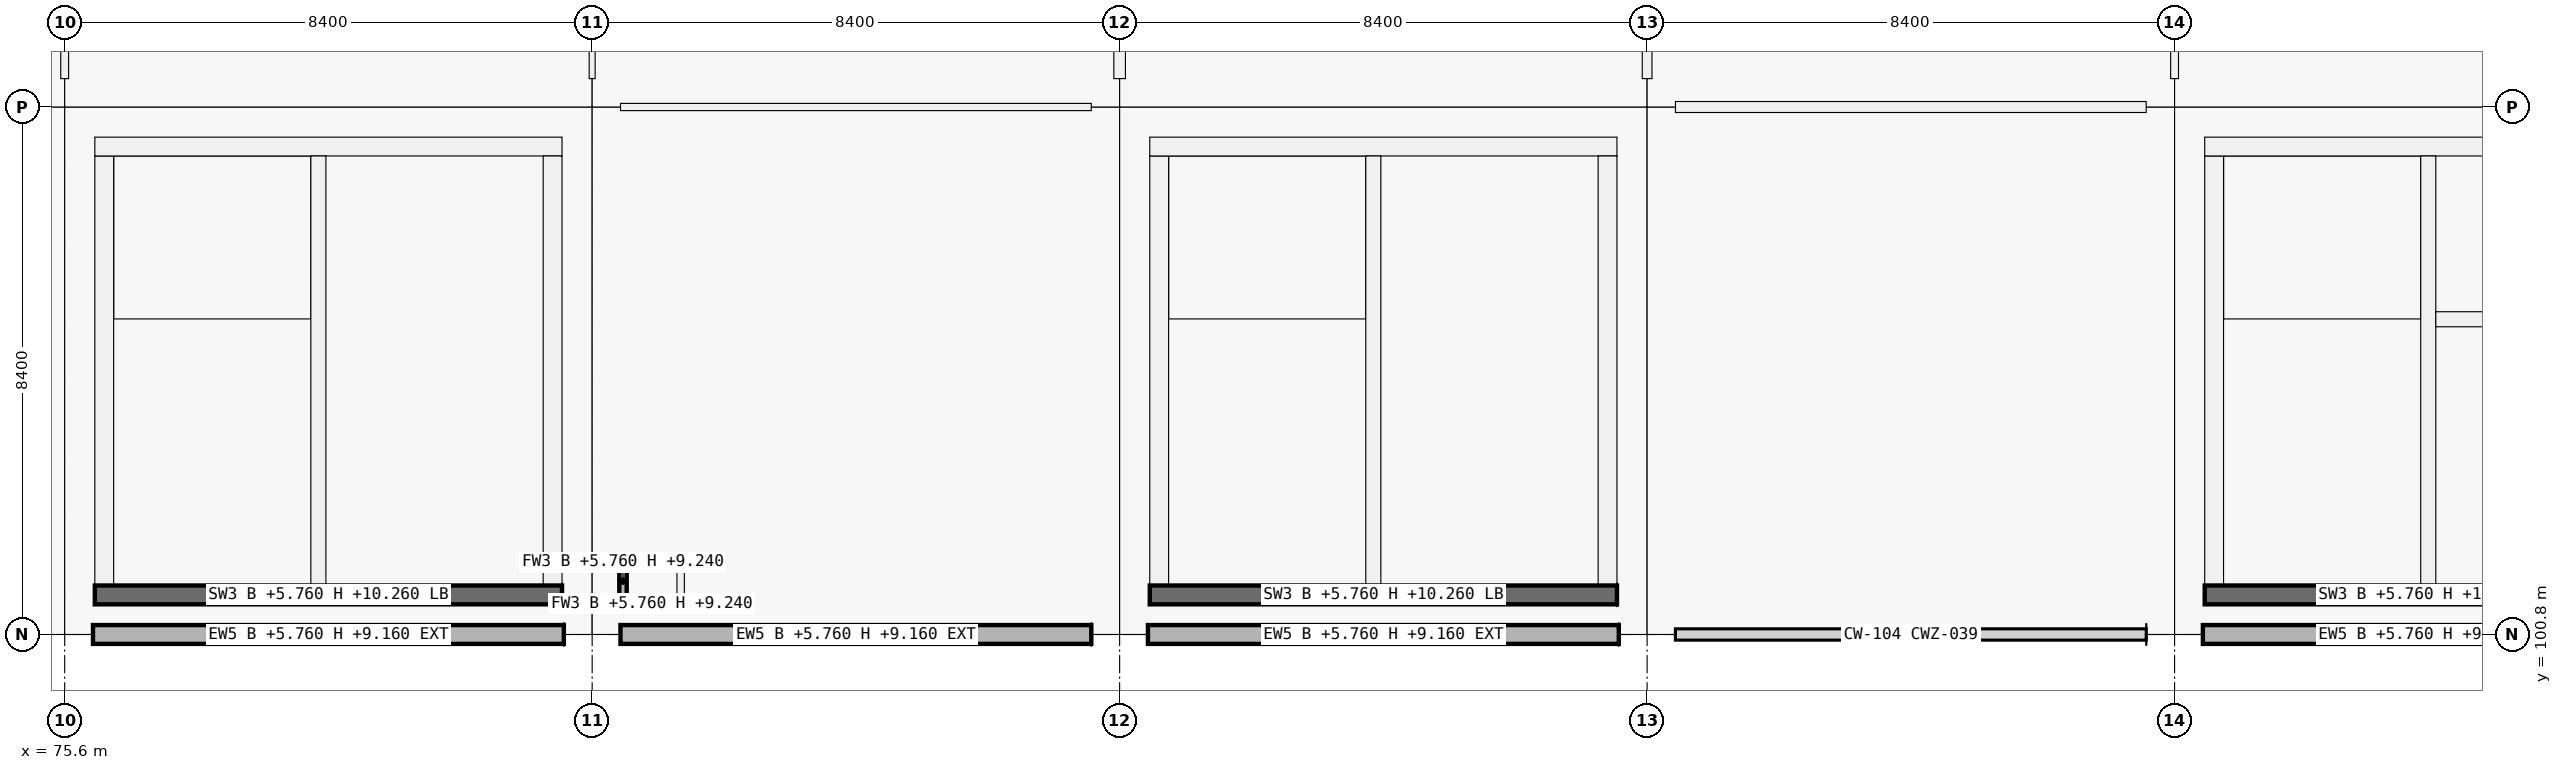
"""IFC4 building model, lengths in metres.
Left out: names, types, materials, properties, quantities, classifications, styles, units other than length and angle.
Written with IfcOpenShell. Run it as: python <this file> out.ifc"""

import sys

from ifc_helpers import new_model, si_unit, direction, frame, frame_2d, origin, origin_2d, place, context, subcontext, project, spatial, rectangle, extrude, element, fill, save


model = new_model("IFC4")
c1 = context("Model", 3, precision=1e-05, world=origin(), true_north=direction((0.0, 1.0)))
c2 = subcontext(c1, "Body", "Model", "MODEL_VIEW")
j1 = project(units=[si_unit("LENGTHUNIT", "METRE"), si_unit("PLANEANGLEUNIT", "RADIAN")], contexts=[c1])
p1 = place(None, origin())
s1 = spatial("IfcSite", under=j1, at=p1, CompositionType="ELEMENT")
p2 = place(p1, origin())
s2 = spatial("IfcBuilding", under=s1, at=p2, CompositionType="ELEMENT")
p3 = place(p2, frame((0.0, 0.0, 5.76)))
s3 = spatial("IfcBuildingStorey", under=s2, at=p3, CompositionType="ELEMENT", Elevation=5.76)
for number, where, z_axis, x_axis in (
    (1, (75.6, 100.8, 0.0), (0.0, 0.0, 1.0), (1.0, 0.0, 0.0)),
    (2, (75.6, 109.2, 0.0), (0.0, 0.0, 1.0), (1.0, 0.0, 0.0)),
    (3, (84.0, 100.8, 0.0), (0.0, 0.0, 1.0), (1.0, 0.0, 0.0)),
    (4, (84.0, 109.2, 0.0), (0.0, 0.0, 1.0), (1.0, 0.0, 0.0)),
    (5, (92.4, 100.8, 0.0), (0.0, 0.0, 1.0), (1.0, 0.0, 0.0)),
    (6, (92.4, 109.2, 0.0), (0.0, 0.0, 1.0), (1.0, 0.0, 0.0)),
    (7, (100.8, 100.8, 0.0), (0.0, 0.0, 1.0), (1.0, 0.0, 0.0)),
    (8, (100.8, 109.2, 0.0), (0.0, 0.0, 1.0), (1.0, 0.0, 0.0)),
    (9, (109.2, 100.8, 0.0), (0.0, 0.0, 1.0), (1.0, 0.0, 0.0)),
    (10, (109.2, 109.2, 0.0), (0.0, 0.0, 1.0), (1.0, 0.0, 0.0)),
):
    element("IfcColumn", number, at=place(p3, frame(where, z_axis=z_axis, x_axis=x_axis)), inside=s3, PredefinedType="COLUMN", context=c2, shape_type="SweptSolid", body=[
        extrude(rectangle(XDim=0.9, YDim=0.9, at=origin_2d()), origin(), (0.0, 0.0, 1.0), 4.5),
    ])
p4 = place(p3, frame((83.549, 100.8, 0.0), z_axis=(0.0, 0.0, 1.0), x_axis=(-1.0, 0.0, 0.0)))
e11 = element("IfcWall", 11, at=p4, inside=s3, PredefinedType="SOLIDWALL", context=c2, shape_type="SweptSolid", body=[
    extrude(rectangle(XDim=7.498, YDim=0.3, at=frame_2d((3.749, 0.0))), origin(), (0.0, 0.0, 1.0), 3.4),
])
p5 = place(p3, frame((91.949, 100.8, 0.0), z_axis=(0.0, 0.0, 1.0), x_axis=(-1.0, 0.0, 0.0)))
e12 = element("IfcWall", 12, at=p5, inside=s3, PredefinedType="SOLIDWALL", context=c2, shape_type="SweptSolid", body=[
    extrude(rectangle(XDim=7.498, YDim=0.3, at=frame_2d((3.749, 0.0))), origin(), (0.0, 0.0, 1.0), 3.4),
])
p6 = place(p5, frame((2.249, 0.0, 0.9)))
e13 = element("IfcOpeningElement", 13, at=p6, cuts=e12, PredefinedType="OPENING", context=c2, shape_type="SweptSolid", body=[
    extrude(rectangle(XDim=3.0, YDim=1.2, at=frame_2d((1.5, 0.6))), frame((0.0, 0.15, 0.0), z_axis=(0.0, -1.0, 0.0), x_axis=(1.0, 0.0, 0.0)), (0.0, 0.0, 1.0), 0.3),
])
for number, where, z_axis, x_axis in (
    (14, (100.349, 100.8, 0.0), (0.0, 0.0, 1.0), (-1.0, 0.0, 0.0)),
    (15, (117.149, 100.8, 0.0), (0.0, 0.0, 1.0), (-1.0, 0.0, 0.0)),
):
    element("IfcWall", number, at=place(p3, frame(where, z_axis=z_axis, x_axis=x_axis)), inside=s3, PredefinedType="SOLIDWALL", context=c2, shape_type="SweptSolid", body=[
        extrude(rectangle(XDim=7.498, YDim=0.3, at=frame_2d((3.749, 0.0))), origin(), (0.0, 0.0, 1.0), 3.4),
    ])
p7 = place(p3, frame((117.12, 101.43, 0.0), z_axis=(0.0, 0.0, 1.0), x_axis=(-1.0, 0.0, 0.0)))
e16 = element("IfcWall", 16, at=p7, inside=s3, PredefinedType="SHEAR", context=c2, shape_type="SweptSolid", body=[
    extrude(rectangle(XDim=7.44, YDim=0.3, at=frame_2d((3.72, 0.0))), origin(), (0.0, 0.0, 1.0), 4.5),
])
p8 = place(p3, frame((109.83, 101.58, 0.0), z_axis=(0.0, 0.0, 1.0), x_axis=(0.0, 1.0, 0.0)))
e17 = element("IfcWall", 17, at=p8, inside=s3, PredefinedType="SHEAR", context=c2, shape_type="SweptSolid", body=[
    extrude(rectangle(XDim=6.84, YDim=0.3, at=frame_2d((3.42, 0.0))), origin(), (0.0, 0.0, 1.0), 4.5),
])
p9 = place(p3, frame((109.68, 108.57, 0.0), z_axis=(0.0, 0.0, 1.0), x_axis=(1.0, 0.0, 0.0)))
e18 = element("IfcWall", 18, at=p9, inside=s3, PredefinedType="SHEAR", context=c2, shape_type="SweptSolid", body=[
    extrude(rectangle(XDim=7.44, YDim=0.3, at=frame_2d((3.72, 0.0))), origin(), (0.0, 0.0, 1.0), 4.5),
])
p10 = place(p3, frame((113.24, 101.58, 0.0), z_axis=(0.0, 0.0, 1.0), x_axis=(0.0, 1.0, 0.0)))
e19 = element("IfcWall", 19, at=p10, inside=s3, PredefinedType="SHEAR", context=c2, shape_type="SweptSolid", body=[
    extrude(rectangle(XDim=6.84, YDim=0.24, at=frame_2d((3.42, 0.0))), origin(), (0.0, 0.0, 1.0), 4.5),
])
p11 = place(p10, frame((0.12, 0.0, 0.0)))
e20 = element("IfcOpeningElement", 20, at=p11, cuts=e19, PredefinedType="OPENING", context=c2, shape_type="SweptSolid", body=[
    extrude(rectangle(XDim=1.0, YDim=2.15, at=frame_2d((0.5, 1.075))), frame((0.0, 0.12, 0.0), z_axis=(0.0, -1.0, 0.0), x_axis=(1.0, 0.0, 0.0)), (0.0, 0.0, 1.0), 0.24),
])
p12 = place(p3, frame((113.36, 105.82, 0.0), z_axis=(0.0, 0.0, 1.0), x_axis=(1.0, 0.0, 0.0)))
e21 = element("IfcWall", 21, at=p12, inside=s3, PredefinedType="SHEAR", context=c2, shape_type="SweptSolid", body=[
    extrude(rectangle(XDim=3.46, YDim=0.24, at=frame_2d((1.73, 0.0))), origin(), (0.0, 0.0, 1.0), 4.5),
])
p13 = place(p12, frame((1.13, 0.0, 0.0)))
e22 = element("IfcOpeningElement", 22, at=p13, cuts=e21, PredefinedType="OPENING", context=c2, shape_type="SweptSolid", body=[
    extrude(rectangle(XDim=1.2, YDim=2.2, at=frame_2d((0.6, 1.1))), frame((0.0, 0.12, 0.0), z_axis=(0.0, -1.0, 0.0), x_axis=(1.0, 0.0, 0.0)), (0.0, 0.0, 1.0), 0.24),
])
p14 = place(p3, frame((83.52, 101.43, 0.0), z_axis=(0.0, 0.0, 1.0), x_axis=(-1.0, 0.0, 0.0)))
e23 = element("IfcWall", 23, at=p14, inside=s3, PredefinedType="SHEAR", context=c2, shape_type="SweptSolid", body=[
    extrude(rectangle(XDim=7.44, YDim=0.3, at=frame_2d((3.72, 0.0))), origin(), (0.0, 0.0, 1.0), 4.5),
])
p15 = place(p3, frame((76.23, 101.58, 0.0), z_axis=(0.0, 0.0, 1.0), x_axis=(0.0, 1.0, 0.0)))
e24 = element("IfcWall", 24, at=p15, inside=s3, PredefinedType="SHEAR", context=c2, shape_type="SweptSolid", body=[
    extrude(rectangle(XDim=6.84, YDim=0.3, at=frame_2d((3.42, 0.0))), origin(), (0.0, 0.0, 1.0), 4.5),
])
p16 = place(p3, frame((76.08, 108.57, 0.0), z_axis=(0.0, 0.0, 1.0), x_axis=(1.0, 0.0, 0.0)))
e25 = element("IfcWall", 25, at=p16, inside=s3, PredefinedType="SHEAR", context=c2, shape_type="SweptSolid", body=[
    extrude(rectangle(XDim=7.44, YDim=0.3, at=frame_2d((3.72, 0.0))), origin(), (0.0, 0.0, 1.0), 4.5),
])
p17 = place(p3, frame((83.37, 108.42, 0.0), z_axis=(0.0, 0.0, 1.0), x_axis=(0.0, -1.0, 0.0)))
e26 = element("IfcWall", 26, at=p17, inside=s3, PredefinedType="SHEAR", context=c2, shape_type="SweptSolid", body=[
    extrude(rectangle(XDim=6.84, YDim=0.3, at=frame_2d((3.42, 0.0))), origin(), (0.0, 0.0, 1.0), 4.5),
])
p18 = place(p17, frame((3.97, 0.0, 0.0)))
e27 = element("IfcOpeningElement", 27, at=p18, cuts=e26, PredefinedType="OPENING", context=c2, shape_type="SweptSolid", body=[
    extrude(rectangle(XDim=1.5, YDim=2.15, at=frame_2d((0.75, 1.075))), frame((0.0, 0.15, 0.0), z_axis=(0.0, -1.0, 0.0), x_axis=(1.0, 0.0, 0.0)), (0.0, 0.0, 1.0), 0.3),
])
p19 = place(p3, frame((79.64, 101.58, 0.0), z_axis=(0.0, 0.0, 1.0), x_axis=(0.0, 1.0, 0.0)))
e28 = element("IfcWall", 28, at=p19, inside=s3, PredefinedType="SHEAR", context=c2, shape_type="SweptSolid", body=[
    extrude(rectangle(XDim=6.84, YDim=0.24, at=frame_2d((3.42, 0.0))), origin(), (0.0, 0.0, 1.0), 4.5),
])
p20 = place(p19, frame((0.12, 0.0, 0.0)))
e29 = element("IfcOpeningElement", 29, at=p20, cuts=e28, PredefinedType="OPENING", context=c2, shape_type="SweptSolid", body=[
    extrude(rectangle(XDim=1.0, YDim=2.15, at=frame_2d((0.5, 1.075))), frame((0.0, 0.12, 0.0), z_axis=(0.0, -1.0, 0.0), x_axis=(1.0, 0.0, 0.0)), (0.0, 0.0, 1.0), 0.24),
])
p21 = place(p3, frame((100.32, 101.43, 0.0), z_axis=(0.0, 0.0, 1.0), x_axis=(-1.0, 0.0, 0.0)))
e30 = element("IfcWall", 30, at=p21, inside=s3, PredefinedType="SHEAR", context=c2, shape_type="SweptSolid", body=[
    extrude(rectangle(XDim=7.44, YDim=0.3, at=frame_2d((3.72, 0.0))), origin(), (0.0, 0.0, 1.0), 4.5),
])
p22 = place(p3, frame((93.03, 101.58, 0.0), z_axis=(0.0, 0.0, 1.0), x_axis=(0.0, 1.0, 0.0)))
e31 = element("IfcWall", 31, at=p22, inside=s3, PredefinedType="SHEAR", context=c2, shape_type="SweptSolid", body=[
    extrude(rectangle(XDim=6.84, YDim=0.3, at=frame_2d((3.42, 0.0))), origin(), (0.0, 0.0, 1.0), 4.5),
])
p23 = place(p3, frame((92.88, 108.57, 0.0), z_axis=(0.0, 0.0, 1.0), x_axis=(1.0, 0.0, 0.0)))
e32 = element("IfcWall", 32, at=p23, inside=s3, PredefinedType="SHEAR", context=c2, shape_type="SweptSolid", body=[
    extrude(rectangle(XDim=7.44, YDim=0.3, at=frame_2d((3.72, 0.0))), origin(), (0.0, 0.0, 1.0), 4.5),
])
p24 = place(p3, frame((100.17, 108.42, 0.0), z_axis=(0.0, 0.0, 1.0), x_axis=(0.0, -1.0, 0.0)))
e33 = element("IfcWall", 33, at=p24, inside=s3, PredefinedType="SHEAR", context=c2, shape_type="SweptSolid", body=[
    extrude(rectangle(XDim=6.84, YDim=0.3, at=frame_2d((3.42, 0.0))), origin(), (0.0, 0.0, 1.0), 4.5),
])
p25 = place(p24, frame((3.97, 0.0, 0.0)))
e34 = element("IfcOpeningElement", 34, at=p25, cuts=e33, PredefinedType="OPENING", context=c2, shape_type="SweptSolid", body=[
    extrude(rectangle(XDim=1.5, YDim=2.15, at=frame_2d((0.75, 1.075))), frame((0.0, 0.15, 0.0), z_axis=(0.0, -1.0, 0.0), x_axis=(1.0, 0.0, 0.0)), (0.0, 0.0, 1.0), 0.3),
])
p26 = place(p3, frame((96.44, 101.58, 0.0), z_axis=(0.0, 0.0, 1.0), x_axis=(0.0, 1.0, 0.0)))
e35 = element("IfcWall", 35, at=p26, inside=s3, PredefinedType="SHEAR", context=c2, shape_type="SweptSolid", body=[
    extrude(rectangle(XDim=6.84, YDim=0.24, at=frame_2d((3.42, 0.0))), origin(), (0.0, 0.0, 1.0), 4.5),
])
p27 = place(p26, frame((0.12, 0.0, 0.0)))
e36 = element("IfcOpeningElement", 36, at=p27, cuts=e35, PredefinedType="OPENING", context=c2, shape_type="SweptSolid", body=[
    extrude(rectangle(XDim=1.0, YDim=2.15, at=frame_2d((0.5, 1.075))), frame((0.0, 0.12, 0.0), z_axis=(0.0, -1.0, 0.0), x_axis=(1.0, 0.0, 0.0)), (0.0, 0.0, 1.0), 0.24),
])
for number, where, z_axis, x_axis in (
    (37, (84.432, 101.291, 0.0), (0.0, 0.0, 1.0), (1.0, 0.0, 0.0)),
    (38, (84.432, 102.009, 0.0), (0.0, 0.0, 1.0), (1.0, 0.0, 0.0)),
):
    element("IfcWall", number, at=place(p3, frame(where, z_axis=z_axis, x_axis=x_axis)), inside=s3, PredefinedType="PARTITIONING", context=c2, shape_type="SweptSolid", body=[
        extrude(rectangle(XDim=1.036, YDim=0.118, at=frame_2d((0.518, 0.0))), origin(), (0.0, 0.0, 1.0), 3.48),
    ])
for number, where, z_axis, x_axis in (
    (39, (84.491, 101.35, 0.0), (0.0, 0.0, 1.0), (0.0, 1.0, 0.0)),
    (40, (85.409, 101.35, 0.0), (0.0, 0.0, 1.0), (0.0, 1.0, 0.0)),
):
    element("IfcWall", number, at=place(p3, frame(where, z_axis=z_axis, x_axis=x_axis)), inside=s3, PredefinedType="PARTITIONING", context=c2, shape_type="SweptSolid", body=[
        extrude(rectangle(XDim=0.6, YDim=0.118, at=frame_2d((0.3, 0.0))), origin(), (0.0, 0.0, 1.0), 3.48),
    ])
p28 = place(p3, frame((84.452, 109.2, 0.0), z_axis=(0.0, 0.0, 1.0), x_axis=(1.0, 0.0, 0.0)))
e41 = element("IfcWall", 41, at=p28, inside=s3, PredefinedType="PARTITIONING", context=c2, shape_type="SweptSolid", body=[
    extrude(rectangle(XDim=7.496, YDim=0.115, at=frame_2d((3.748, 0.0))), origin(), (0.0, 0.0, 1.0), 2.4),
])
p29 = place(p28, frame((3.218, 0.0, 0.0)))
e42 = element("IfcOpeningElement", 42, at=p29, cuts=e41, PredefinedType="OPENING", context=c2, shape_type="SweptSolid", body=[
    extrude(rectangle(XDim=1.06, YDim=2.22, at=frame_2d((0.53, 1.11))), frame((0.0, 0.058, 0.0), z_axis=(0.0, -1.0, 0.0), x_axis=(1.0, 0.0, 0.0)), (0.0, 0.0, 1.0), 0.115),
])
p30 = place(p3, frame((101.252, 109.2, 0.0), z_axis=(0.0, 0.0, 1.0), x_axis=(1.0, 0.0, 0.0)))
e43 = element("IfcWall", 43, at=p30, inside=s3, PredefinedType="PARTITIONING", context=c2, shape_type="SweptSolid", body=[
    extrude(rectangle(XDim=7.496, YDim=0.175, at=frame_2d((3.748, 0.0))), origin(), (0.0, 0.0, 1.0), 2.4),
])
p31 = place(p30, frame((3.238, 0.0, 0.0)))
e44 = element("IfcOpeningElement", 44, at=p31, cuts=e43, PredefinedType="OPENING", context=c2, shape_type="SweptSolid", body=[
    extrude(rectangle(XDim=1.02, YDim=2.2, at=frame_2d((0.51, 1.1))), frame((0.0, 0.087, 0.0), z_axis=(0.0, -1.0, 0.0), x_axis=(1.0, 0.0, 0.0)), (0.0, 0.0, 1.0), 0.175),
])
p32 = place(p3, frame((75.6, 109.652, 0.0), z_axis=(0.0, 0.0, 1.0), x_axis=(0.0, 1.0, 0.0)))
e45 = element("IfcWall", 45, at=p32, inside=s3, PredefinedType="PARTITIONING", context=c2, shape_type="SweptSolid", body=[
    extrude(rectangle(XDim=7.646, YDim=0.125, at=frame_2d((3.823, 0.0))), origin(), (0.0, 0.0, 1.0), 2.4),
])
p33 = place(p3, frame((84.0, 109.652, 0.0), z_axis=(0.0, 0.0, 1.0), x_axis=(0.0, 1.0, 0.0)))
e46 = element("IfcWall", 46, at=p33, inside=s3, PredefinedType="PARTITIONING", context=c2, shape_type="SweptSolid", body=[
    extrude(rectangle(XDim=7.646, YDim=0.095, at=frame_2d((3.823, 0.0))), origin(), (0.0, 0.0, 1.0), 2.4),
])
p34 = place(p33, frame((3.353, 0.0, 0.0)))
e47 = element("IfcOpeningElement", 47, at=p34, cuts=e46, PredefinedType="OPENING", context=c2, shape_type="SweptSolid", body=[
    extrude(rectangle(XDim=0.94, YDim=2.15, at=frame_2d((0.47, 1.075))), frame((0.0, 0.047, 0.0), z_axis=(0.0, -1.0, 0.0), x_axis=(1.0, 0.0, 0.0)), (0.0, 0.0, 1.0), 0.095),
])
p35 = place(p3, frame((92.4, 109.652, 0.0), z_axis=(0.0, 0.0, 1.0), x_axis=(0.0, 1.0, 0.0)))
e48 = element("IfcWall", 48, at=p35, inside=s3, PredefinedType="PARTITIONING", context=c2, shape_type="SweptSolid", body=[
    extrude(rectangle(XDim=7.646, YDim=0.185, at=frame_2d((3.823, 0.0))), origin(), (0.0, 0.0, 1.0), 2.4),
])
p36 = place(p35, frame((3.363, 0.0, 0.0)))
e49 = element("IfcOpeningElement", 49, at=p36, cuts=e48, PredefinedType="OPENING", context=c2, shape_type="SweptSolid", body=[
    extrude(rectangle(XDim=0.92, YDim=2.15, at=frame_2d((0.46, 1.075))), frame((0.0, 0.093, 0.0), z_axis=(0.0, -1.0, 0.0), x_axis=(1.0, 0.0, 0.0)), (0.0, 0.0, 1.0), 0.185),
])
p37 = place(p3, frame((100.8, 109.652, 0.0), z_axis=(0.0, 0.0, 1.0), x_axis=(0.0, 1.0, 0.0)))
e50 = element("IfcWall", 50, at=p37, inside=s3, PredefinedType="PARTITIONING", context=c2, shape_type="SweptSolid", body=[
    extrude(rectangle(XDim=7.646, YDim=0.155, at=frame_2d((3.823, 0.0))), origin(), (0.0, 0.0, 1.0), 2.4),
])
p38 = place(p37, frame((3.343, 0.0, 0.0)))
e51 = element("IfcOpeningElement", 51, at=p38, cuts=e50, PredefinedType="OPENING", context=c2, shape_type="SweptSolid", body=[
    extrude(rectangle(XDim=0.96, YDim=2.18, at=frame_2d((0.48, 1.09))), frame((0.0, 0.078, 0.0), z_axis=(0.0, -1.0, 0.0), x_axis=(1.0, 0.0, 0.0)), (0.0, 0.0, 1.0), 0.155),
])
p39 = place(p3, frame((109.2, 109.652, 0.0), z_axis=(0.0, 0.0, 1.0), x_axis=(0.0, 1.0, 0.0)))
e52 = element("IfcWall", 52, at=p39, inside=s3, PredefinedType="PARTITIONING", context=c2, shape_type="SweptSolid", body=[
    extrude(rectangle(XDim=7.646, YDim=0.125, at=frame_2d((3.823, 0.0))), origin(), (0.0, 0.0, 1.0), 2.4),
])
p40 = place(p39, frame((3.298, 0.0, 0.0)))
e53 = element("IfcOpeningElement", 53, at=p40, cuts=e52, PredefinedType="OPENING", context=c2, shape_type="SweptSolid", body=[
    extrude(rectangle(XDim=1.05, YDim=2.12, at=frame_2d((0.525, 1.06))), frame((0.0, 0.062, 0.0), z_axis=(0.0, -1.0, 0.0), x_axis=(1.0, 0.0, 0.0)), (0.0, 0.0, 1.0), 0.125),
])
p41 = place(p6, origin())
e54 = element("IfcWindow", 54, at=p41, inside=s3, PartitioningType="SINGLE_PANEL", PredefinedType="WINDOW", context=c2, shape_type="SweptSolid", body=[
    extrude(rectangle(XDim=3.0, YDim=1.2, at=frame_2d((1.5, 0.6))), frame((0.0, 0.03, 0.0), z_axis=(0.0, -1.0, 0.0), x_axis=(1.0, 0.0, 0.0)), (0.0, 0.0, 1.0), 0.06),
])
fill(e13, e54)
p42 = place(p11, origin())
e55 = element("IfcDoor", 55, at=p42, inside=s3, OperationType="SINGLE_SWING_LEFT", PredefinedType="DOOR", context=c2, shape_type="SweptSolid", body=[
    extrude(rectangle(XDim=1.0, YDim=2.15, at=frame_2d((0.5, 1.075))), frame((0.0, 0.025, 0.0), z_axis=(0.0, -1.0, 0.0), x_axis=(1.0, 0.0, 0.0)), (0.0, 0.0, 1.0), 0.05),
])
fill(e20, e55)
p43 = place(p20, origin())
e56 = element("IfcDoor", 56, at=p43, inside=s3, OperationType="SINGLE_SWING_RIGHT", PredefinedType="DOOR", context=c2, shape_type="SweptSolid", body=[
    extrude(rectangle(XDim=1.0, YDim=2.15, at=frame_2d((0.5, 1.075))), frame((0.0, 0.025, 0.0), z_axis=(0.0, -1.0, 0.0), x_axis=(1.0, 0.0, 0.0)), (0.0, 0.0, 1.0), 0.05),
])
fill(e29, e56)
p44 = place(p18, origin())
e57 = element("IfcDoor", 57, at=p44, inside=s3, OperationType="DOUBLE_DOOR_SINGLE_SWING", PredefinedType="DOOR", context=c2, shape_type="SweptSolid", body=[
    extrude(rectangle(XDim=1.5, YDim=2.15, at=frame_2d((0.75, 1.075))), frame((0.0, 0.025, 0.0), z_axis=(0.0, -1.0, 0.0), x_axis=(1.0, 0.0, 0.0)), (0.0, 0.0, 1.0), 0.05),
])
fill(e27, e57)
p45 = place(p27, origin())
e58 = element("IfcDoor", 58, at=p45, inside=s3, OperationType="SINGLE_SWING_LEFT", PredefinedType="DOOR", context=c2, shape_type="SweptSolid", body=[
    extrude(rectangle(XDim=1.0, YDim=2.15, at=frame_2d((0.5, 1.075))), frame((0.0, 0.025, 0.0), z_axis=(0.0, -1.0, 0.0), x_axis=(1.0, 0.0, 0.0)), (0.0, 0.0, 1.0), 0.05),
])
fill(e36, e58)
p46 = place(p25, origin())
e59 = element("IfcDoor", 59, at=p46, inside=s3, OperationType="DOUBLE_DOOR_SINGLE_SWING", PredefinedType="DOOR", context=c2, shape_type="SweptSolid", body=[
    extrude(rectangle(XDim=1.5, YDim=2.15, at=frame_2d((0.75, 1.075))), frame((0.0, 0.025, 0.0), z_axis=(0.0, -1.0, 0.0), x_axis=(1.0, 0.0, 0.0)), (0.0, 0.0, 1.0), 0.05),
])
fill(e34, e59)
p47 = place(p29, origin())
e60 = element("IfcDoor", 60, at=p47, inside=s3, OperationType="SINGLE_SWING_RIGHT", PredefinedType="DOOR", context=c2, shape_type="SweptSolid", body=[
    extrude(rectangle(XDim=1.06, YDim=2.22, at=frame_2d((0.53, 1.11))), frame((0.0, 0.025, 0.0), z_axis=(0.0, -1.0, 0.0), x_axis=(1.0, 0.0, 0.0)), (0.0, 0.0, 1.0), 0.05),
])
fill(e42, e60)
p48 = place(p31, origin())
e61 = element("IfcDoor", 61, at=p48, inside=s3, OperationType="SINGLE_SWING_LEFT", PredefinedType="DOOR", context=c2, shape_type="SweptSolid", body=[
    extrude(rectangle(XDim=1.02, YDim=2.2, at=frame_2d((0.51, 1.1))), frame((0.0, 0.025, 0.0), z_axis=(0.0, -1.0, 0.0), x_axis=(1.0, 0.0, 0.0)), (0.0, 0.0, 1.0), 0.05),
])
fill(e44, e61)
save(model, sys.argv[1])
